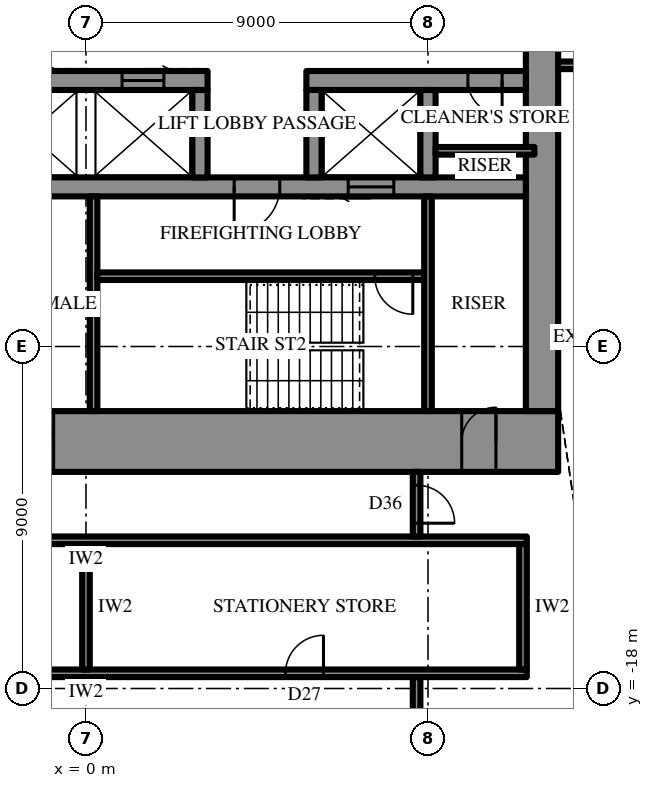
"""IFC4 building model, lengths in metres.
Left out: names, types, materials, properties, quantities, classifications, styles, units other than length and angle.
Written with IfcOpenShell. Run it as: python <this file> out.ifc"""

import sys

from ifc_helpers import new_model, si_unit, direction, frame, frame_2d, origin, place, context, subcontext, project, spatial, rectangle, extrude, element, fill, save


model = new_model("IFC4")
c1 = context("Model", 3, precision=1e-05, world=origin(), true_north=direction((0.0, 1.0)))
c2 = subcontext(c1, "Body", "Model", "MODEL_VIEW")
j1 = project(units=[si_unit("LENGTHUNIT", "METRE"), si_unit("PLANEANGLEUNIT", "RADIAN")], contexts=[c1])
p1 = place(None, origin())
s1 = spatial("IfcSite", under=j1, at=p1, CompositionType="ELEMENT")
p2 = place(p1, origin())
s2 = spatial("IfcBuilding", under=s1, at=p2, CompositionType="ELEMENT")
p3 = place(p2, frame((0.0, 0.0, 340.9)))
s3 = spatial("IfcBuildingStorey", under=s2, at=p3, CompositionType="ELEMENT", Elevation=340.9)
p4 = place(p3, frame((12.425, -11.5, 0.0), z_axis=(0.0, 0.0, 1.0), x_axis=(-1.0, 0.0, 0.0)))
e1 = element("IfcWall", 1, at=p4, inside=s3, PredefinedType="SHEAR", context=c2, shape_type="SweptSolid", body=[
    extrude(rectangle(XDim=24.85, YDim=1.6, at=frame_2d((12.425, 0.0))), origin(), (0.0, 0.0, 1.0), 4.2),
])
p5 = place(p4, frame((13.275, 0.0, 0.0)))
e2 = element("IfcOpeningElement", 2, at=p5, cuts=e1, PredefinedType="OPENING", context=c2, shape_type="SweptSolid", body=[
    extrude(rectangle(XDim=0.9, YDim=2.2, at=frame_2d((0.45, 1.1))), frame((0.0, 0.81, 0.0), z_axis=(0.0, -1.0, 0.0), x_axis=(1.0, 0.0, 0.0)), (0.0, 0.0, 1.0), 1.62),
])
p6 = place(p4, frame((16.275, 0.0, 0.0)))
e3 = element("IfcOpeningElement", 3, at=p6, cuts=e1, PredefinedType="OPENING", context=c2, shape_type="SweptSolid", body=[
    extrude(rectangle(XDim=0.9, YDim=2.2, at=frame_2d((0.45, 1.1))), frame((0.0, 0.81, 0.0), z_axis=(0.0, -1.0, 0.0), x_axis=(1.0, 0.0, 0.0)), (0.0, 0.0, 1.0), 1.62),
])
p7 = place(p4, frame((19.325, 0.0, 0.0)))
e4 = element("IfcOpeningElement", 4, at=p7, cuts=e1, PredefinedType="OPENING", context=c2, shape_type="SweptSolid", body=[
    extrude(rectangle(XDim=1.0, YDim=2.2, at=frame_2d((0.5, 1.1))), frame((0.0, 0.81, 0.0), z_axis=(0.0, -1.0, 0.0), x_axis=(1.0, 0.0, 0.0)), (0.0, 0.0, 1.0), 1.62),
])
p8 = place(p4, frame((1.637, 0.0, 0.0)))
e5 = element("IfcOpeningElement", 5, at=p8, cuts=e1, PredefinedType="OPENING", context=c2, shape_type="SweptSolid", body=[
    extrude(rectangle(XDim=0.9, YDim=2.2, at=frame_2d((0.45, 1.1))), frame((0.0, 0.81, 0.0), z_axis=(0.0, -1.0, 0.0), x_axis=(1.0, 0.0, 0.0)), (0.0, 0.0, 1.0), 1.62),
])
p9 = place(p4, frame((22.312, 0.0, 0.0)))
e6 = element("IfcOpeningElement", 6, at=p9, cuts=e1, PredefinedType="OPENING", context=c2, shape_type="SweptSolid", body=[
    extrude(rectangle(XDim=0.9, YDim=2.2, at=frame_2d((0.45, 1.1))), frame((0.0, 0.81, 0.0), z_axis=(0.0, -1.0, 0.0), x_axis=(1.0, 0.0, 0.0)), (0.0, 0.0, 1.0), 1.62),
])
p10 = place(p3, frame((12.0, -10.7, 0.0), z_axis=(0.0, 0.0, 1.0), x_axis=(0.0, 1.0, 0.0)))
e7 = element("IfcWall", 7, at=p10, inside=s3, PredefinedType="SHEAR", context=c2, shape_type="SweptSolid", body=[
    extrude(rectangle(XDim=21.4, YDim=0.85, at=frame_2d((10.7, 0.0))), origin(), (0.0, 0.0, 1.0), 4.2),
])
p11 = place(p10, frame((9.8, 0.0, 0.0)))
e8 = element("IfcOpeningElement", 8, at=p11, cuts=e7, PredefinedType="OPENING", context=c2, shape_type="SweptSolid", body=[
    extrude(rectangle(XDim=1.8, YDim=2.4, at=frame_2d((0.9, 1.2))), frame((0.0, 0.435, 0.0), z_axis=(0.0, -1.0, 0.0), x_axis=(1.0, 0.0, 0.0)), (0.0, 0.0, 1.0), 0.87),
])
p12 = place(p3, frame((11.575, -2.0, 0.0), z_axis=(0.0, 0.0, 1.0), x_axis=(-1.0, 0.0, 0.0)))
e9 = element("IfcWall", 9, at=p12, inside=s3, PredefinedType="SHEAR", context=c2, shape_type="SweptSolid", body=[
    extrude(rectangle(XDim=5.775, YDim=0.5, at=frame_2d((2.887, 0.0))), origin(), (0.0, 0.0, 1.0), 4.2),
])
p13 = place(p12, frame((0.625, 0.0, 0.0)))
e10 = element("IfcOpeningElement", 10, at=p13, cuts=e9, PredefinedType="OPENING", context=c2, shape_type="SweptSolid", body=[
    extrude(rectangle(XDim=0.9, YDim=2.2, at=frame_2d((0.45, 1.1))), frame((0.0, 0.26, 0.0), z_axis=(0.0, -1.0, 0.0), x_axis=(1.0, 0.0, 0.0)), (0.0, 0.0, 1.0), 0.52),
])
p14 = place(p3, frame((3.2, -2.0, 0.0), z_axis=(0.0, 0.0, 1.0), x_axis=(-1.0, 0.0, 0.0)))
e11 = element("IfcWall", 11, at=p14, inside=s3, PredefinedType="SHEAR", context=c2, shape_type="SweptSolid", body=[
    extrude(rectangle(XDim=14.775, YDim=0.5, at=frame_2d((7.387, 0.0))), origin(), (0.0, 0.0, 1.0), 4.2),
])
p15 = place(p14, frame((13.25, 0.0, 0.0)))
e12 = element("IfcOpeningElement", 12, at=p15, cuts=e11, PredefinedType="OPENING", context=c2, shape_type="SweptSolid", body=[
    extrude(rectangle(XDim=0.9, YDim=2.2, at=frame_2d((0.45, 1.1))), frame((0.0, 0.26, 0.0), z_axis=(0.0, -1.0, 0.0), x_axis=(1.0, 0.0, 0.0)), (0.0, 0.0, 1.0), 0.52),
])
p16 = place(p14, frame((1.15, 0.0, 0.0)))
e13 = element("IfcOpeningElement", 13, at=p16, cuts=e11, PredefinedType="OPENING", context=c2, shape_type="SweptSolid", body=[
    extrude(rectangle(XDim=1.1, YDim=2.2, at=frame_2d((0.55, 1.1))), frame((0.0, 0.26, 0.0), z_axis=(0.0, -1.0, 0.0), x_axis=(1.0, 0.0, 0.0)), (0.0, 0.0, 1.0), 0.52),
])
p17 = place(p14, frame((4.15, 0.0, 0.0)))
e14 = element("IfcOpeningElement", 14, at=p17, cuts=e11, PredefinedType="OPENING", context=c2, shape_type="SweptSolid", body=[
    extrude(rectangle(XDim=1.1, YDim=2.2, at=frame_2d((0.55, 1.1))), frame((0.0, 0.26, 0.0), z_axis=(0.0, -1.0, 0.0), x_axis=(1.0, 0.0, 0.0)), (0.0, 0.0, 1.0), 0.52),
])
p18 = place(p14, frame((7.15, 0.0, 0.0)))
e15 = element("IfcOpeningElement", 15, at=p18, cuts=e11, PredefinedType="OPENING", context=c2, shape_type="SweptSolid", body=[
    extrude(rectangle(XDim=1.1, YDim=2.2, at=frame_2d((0.55, 1.1))), frame((0.0, 0.26, 0.0), z_axis=(0.0, -1.0, 0.0), x_axis=(1.0, 0.0, 0.0)), (0.0, 0.0, 1.0), 0.52),
])
p19 = place(p14, frame((10.15, 0.0, 0.0)))
e16 = element("IfcOpeningElement", 16, at=p19, cuts=e11, PredefinedType="OPENING", context=c2, shape_type="SweptSolid", body=[
    extrude(rectangle(XDim=1.1, YDim=2.2, at=frame_2d((0.55, 1.1))), frame((0.0, 0.26, 0.0), z_axis=(0.0, -1.0, 0.0), x_axis=(1.0, 0.0, 0.0)), (0.0, 0.0, 1.0), 0.52),
])
p20 = place(p3, frame((11.575, -4.8, 0.0), z_axis=(0.0, 0.0, 1.0), x_axis=(-1.0, 0.0, 0.0)))
e17 = element("IfcWall", 17, at=p20, inside=s3, PredefinedType="SHEAR", context=c2, shape_type="SweptSolid", body=[
    extrude(rectangle(XDim=23.15, YDim=0.5, at=frame_2d((11.575, 0.0))), origin(), (0.0, 0.0, 1.0), 4.2),
])
p21 = place(p20, frame((6.475, 0.0, 0.0)))
e18 = element("IfcOpeningElement", 18, at=p21, cuts=e17, PredefinedType="OPENING", context=c2, shape_type="SweptSolid", body=[
    extrude(rectangle(XDim=1.2, YDim=2.2, at=frame_2d((0.6, 1.1))), frame((0.0, 0.26, 0.0), z_axis=(0.0, -1.0, 0.0), x_axis=(1.0, 0.0, 0.0)), (0.0, 0.0, 1.0), 0.52),
])
p22 = place(p20, frame((3.475, 0.0, 0.0)))
e19 = element("IfcOpeningElement", 19, at=p22, cuts=e17, PredefinedType="OPENING", context=c2, shape_type="SweptSolid", body=[
    extrude(rectangle(XDim=1.2, YDim=2.2, at=frame_2d((0.6, 1.1))), frame((0.0, 0.26, 0.0), z_axis=(0.0, -1.0, 0.0), x_axis=(1.0, 0.0, 0.0)), (0.0, 0.0, 1.0), 0.52),
])
for number, where, z_axis, x_axis in (
    (20, (9.0, -2.25, 0.0), (0.0, 0.0, 1.0), (0.0, -1.0, 0.0)),
    (21, (6.0, -2.25, 0.0), (0.0, 0.0, 1.0), (0.0, -1.0, 0.0)),
    (22, (3.0, -2.25, 0.0), (0.0, 0.0, 1.0), (0.0, -1.0, 0.0)),
):
    element("IfcWall", number, at=place(p3, frame(where, z_axis=z_axis, x_axis=x_axis)), inside=s3, PredefinedType="SHEAR", context=c2, shape_type="SweptSolid", body=[
        extrude(rectangle(XDim=2.3, YDim=0.4, at=frame_2d((1.15, 0.0))), origin(), (0.0, 0.0, 1.0), 4.2),
    ])
p23 = place(p3, frame((0.2, -5.05, 0.0), z_axis=(0.0, 0.0, 1.0), x_axis=(0.0, -1.0, 0.0)))
e23 = element("IfcWall", 23, at=p23, inside=s3, PredefinedType="SHEAR", context=c2, shape_type="SweptSolid", body=[
    extrude(rectangle(XDim=5.65, YDim=0.2, at=frame_2d((2.825, 0.0))), origin(), (0.0, 0.0, 1.0), 4.2),
])
p24 = place(p3, frame((8.9, -7.15, 0.0), z_axis=(0.0, 0.0, 1.0), x_axis=(-1.0, 0.0, 0.0)))
e24 = element("IfcWall", 24, at=p24, inside=s3, PredefinedType="SHEAR", context=c2, shape_type="SweptSolid", body=[
    extrude(rectangle(XDim=8.6, YDim=0.2, at=frame_2d((4.3, 0.0))), origin(), (0.0, 0.0, 1.0), 4.2),
])
p25 = place(p24, frame((0.3, 0.0, 0.0)))
e25 = element("IfcOpeningElement", 25, at=p25, cuts=e24, PredefinedType="OPENING", context=c2, shape_type="SweptSolid", body=[
    extrude(rectangle(XDim=1.0, YDim=2.2, at=frame_2d((0.5, 1.1))), frame((0.0, 0.11, 0.0), z_axis=(0.0, -1.0, 0.0), x_axis=(1.0, 0.0, 0.0)), (0.0, 0.0, 1.0), 0.22),
])
p26 = place(p3, frame((9.0, -5.05, 0.0), z_axis=(0.0, 0.0, 1.0), x_axis=(0.0, -1.0, 0.0)))
e26 = element("IfcWall", 26, at=p26, inside=s3, PredefinedType="PARTITIONING", context=c2, shape_type="SweptSolid", body=[
    extrude(rectangle(XDim=5.65, YDim=0.2, at=frame_2d((2.825, 0.0))), origin(), (0.0, 0.0, 1.0), 4.0),
])
p27 = place(p3, frame((11.8, -3.85, 0.0), z_axis=(0.0, 0.0, 1.0), x_axis=(-1.0, 0.0, 0.0)))
e27 = element("IfcWall", 27, at=p27, inside=s3, PredefinedType="PARTITIONING", context=c2, shape_type="SweptSolid", body=[
    extrude(rectangle(XDim=2.6, YDim=0.2, at=frame_2d((1.3, 0.0))), origin(), (0.0, 0.0, 1.0), 4.0),
])
p28 = place(p3, frame((11.6, -14.1, 0.0), z_axis=(0.0, 0.0, 1.0), x_axis=(-1.0, 0.0, 0.0)))
e28 = element("IfcWall", 28, at=p28, inside=s3, PredefinedType="PARTITIONING", context=c2, shape_type="SweptSolid", body=[
    extrude(rectangle(XDim=23.2, YDim=0.2, at=frame_2d((11.6, 0.0))), origin(), (0.0, 0.0, 1.0), 4.0),
])
p29 = place(p3, frame((11.6, -17.6, 0.0), z_axis=(0.0, 0.0, 1.0), x_axis=(-1.0, 0.0, 0.0)))
e29 = element("IfcWall", 29, at=p29, inside=s3, PredefinedType="PARTITIONING", context=c2, shape_type="SweptSolid", body=[
    extrude(rectangle(XDim=23.2, YDim=0.2, at=frame_2d((11.6, 0.0))), origin(), (0.0, 0.0, 1.0), 4.0),
])
p30 = place(p29, frame((5.35, 0.0, 0.0)))
e30 = element("IfcOpeningElement", 30, at=p30, cuts=e29, PredefinedType="OPENING", context=c2, shape_type="SweptSolid", body=[
    extrude(rectangle(XDim=1.0, YDim=2.2, at=frame_2d((0.5, 1.1))), frame((0.0, 0.11, 0.0), z_axis=(0.0, -1.0, 0.0), x_axis=(1.0, 0.0, 0.0)), (0.0, 0.0, 1.0), 0.22),
])
p31 = place(p29, frame((16.85, 0.0, 0.0)))
e31 = element("IfcOpeningElement", 31, at=p31, cuts=e29, PredefinedType="OPENING", context=c2, shape_type="SweptSolid", body=[
    extrude(rectangle(XDim=1.0, YDim=2.2, at=frame_2d((0.5, 1.1))), frame((0.0, 0.11, 0.0), z_axis=(0.0, -1.0, 0.0), x_axis=(1.0, 0.0, 0.0)), (0.0, 0.0, 1.0), 0.22),
])
p32 = place(p3, frame((11.5, -14.2, 0.0), z_axis=(0.0, 0.0, 1.0), x_axis=(0.0, -1.0, 0.0)))
e32 = element("IfcWall", 32, at=p32, inside=s3, PredefinedType="PARTITIONING", context=c2, shape_type="SweptSolid", body=[
    extrude(rectangle(XDim=3.3, YDim=0.2, at=frame_2d((1.65, 0.0))), origin(), (0.0, 0.0, 1.0), 4.0),
])
p33 = place(p3, frame((0.0, -14.2, 0.0), z_axis=(0.0, 0.0, 1.0), x_axis=(0.0, -1.0, 0.0)))
e33 = element("IfcWall", 33, at=p33, inside=s3, PredefinedType="PARTITIONING", context=c2, shape_type="SweptSolid", body=[
    extrude(rectangle(XDim=3.3, YDim=0.2, at=frame_2d((1.65, 0.0))), origin(), (0.0, 0.0, 1.0), 2.992),
])
p34 = place(p3, frame((8.7, -12.3, 0.0), z_axis=(0.0, 0.0, 1.0), x_axis=(0.0, -1.0, 0.0)))
e34 = element("IfcWall", 34, at=p34, inside=s3, PredefinedType="PARTITIONING", context=c2, shape_type="SweptSolid", body=[
    extrude(rectangle(XDim=1.7, YDim=0.2, at=frame_2d((0.85, 0.0))), origin(), (0.0, 0.0, 1.0), 2.992),
])
p35 = place(p34, frame((0.35, 0.0, 0.0)))
e35 = element("IfcOpeningElement", 35, at=p35, cuts=e34, PredefinedType="OPENING", context=c2, shape_type="SweptSolid", body=[
    extrude(rectangle(XDim=1.0, YDim=2.2, at=frame_2d((0.5, 1.1))), frame((0.0, 0.11, 0.0), z_axis=(0.0, -1.0, 0.0), x_axis=(1.0, 0.0, 0.0)), (0.0, 0.0, 1.0), 0.22),
])
p36 = place(p3, frame((8.7, -17.7, 0.0), z_axis=(0.0, 0.0, 1.0), x_axis=(0.0, -1.0, 0.0)))
e36 = element("IfcWall", 36, at=p36, inside=s3, PredefinedType="PARTITIONING", context=c2, shape_type="SweptSolid", body=[
    extrude(rectangle(XDim=8.15, YDim=0.2, at=frame_2d((4.075, 0.0))), origin(), (0.0, 0.0, 1.0), 2.992),
])
p37 = place(p3, frame((12.425, -1.6, 0.0), z_axis=(0.0, 0.0, 1.0), x_axis=(1.0, 0.0, 0.0)))
e37 = element("IfcWall", 37, at=p37, inside=s3, PredefinedType="PARTITIONING", context=c2, shape_type="SweptSolid", body=[
    extrude(rectangle(XDim=16.5, YDim=0.2, at=frame_2d((8.25, 0.0))), origin(), (0.0, 0.0, 1.0), 4.0),
])
p38 = place(p37, frame((1.15, 0.0, 0.0)))
e38 = element("IfcOpeningElement", 38, at=p38, cuts=e37, PredefinedType="OPENING", context=c2, shape_type="SweptSolid", body=[
    extrude(rectangle(XDim=1.0, YDim=2.2, at=frame_2d((0.5, 1.1))), frame((0.0, 0.11, 0.0), z_axis=(0.0, -1.0, 0.0), x_axis=(1.0, 0.0, 0.0)), (0.0, 0.0, 1.0), 0.22),
])
p39 = place(p21, origin())
e39 = element("IfcDoor", 39, at=p39, inside=s3, OperationType="SINGLE_SWING_LEFT", PredefinedType="DOOR", context=c2, shape_type="SweptSolid", body=[
    extrude(rectangle(XDim=1.2, YDim=2.2, at=frame_2d((0.6, 1.1))), frame((0.0, 0.025, 0.0), z_axis=(0.0, -1.0, 0.0), x_axis=(1.0, 0.0, 0.0)), (0.0, 0.0, 1.0), 0.05),
])
fill(e18, e39)
p40 = place(p25, origin())
e40 = element("IfcDoor", 40, at=p40, inside=s3, OperationType="SINGLE_SWING_RIGHT", PredefinedType="DOOR", context=c2, shape_type="SweptSolid", body=[
    extrude(rectangle(XDim=1.0, YDim=2.2, at=frame_2d((0.5, 1.1))), frame((0.0, 0.025, 0.0), z_axis=(0.0, -1.0, 0.0), x_axis=(1.0, 0.0, 0.0)), (0.0, 0.0, 1.0), 0.05),
])
fill(e25, e40)
p41 = place(p5, frame((0.9, 0.0, 0.0), z_axis=(0.0, 0.0, 1.0), x_axis=(-1.0, 0.0, 0.0)))
e41 = element("IfcDoor", 41, at=p41, inside=s3, OperationType="SINGLE_SWING_RIGHT", PredefinedType="DOOR", context=c2, shape_type="SweptSolid", body=[
    extrude(rectangle(XDim=0.9, YDim=2.2, at=frame_2d((0.45, 1.1))), frame((0.0, 0.025, 0.0), z_axis=(0.0, -1.0, 0.0), x_axis=(1.0, 0.0, 0.0)), (0.0, 0.0, 1.0), 0.05),
])
fill(e2, e41)
p42 = place(p8, frame((0.9, 0.0, 0.0), z_axis=(0.0, 0.0, 1.0), x_axis=(-1.0, 0.0, 0.0)))
e42 = element("IfcDoor", 42, at=p42, inside=s3, OperationType="SINGLE_SWING_LEFT", PredefinedType="DOOR", context=c2, shape_type="SweptSolid", body=[
    extrude(rectangle(XDim=0.9, YDim=2.2, at=frame_2d((0.45, 1.1))), frame((0.0, 0.025, 0.0), z_axis=(0.0, -1.0, 0.0), x_axis=(1.0, 0.0, 0.0)), (0.0, 0.0, 1.0), 0.05),
])
fill(e5, e42)
p43 = place(p13, origin())
e43 = element("IfcDoor", 43, at=p43, inside=s3, OperationType="SINGLE_SWING_RIGHT", PredefinedType="DOOR", context=c2, shape_type="SweptSolid", body=[
    extrude(rectangle(XDim=0.9, YDim=2.2, at=frame_2d((0.45, 1.1))), frame((0.0, 0.025, 0.0), z_axis=(0.0, -1.0, 0.0), x_axis=(1.0, 0.0, 0.0)), (0.0, 0.0, 1.0), 0.05),
])
fill(e10, e43)
p44 = place(p22, origin())
e44 = element("IfcDoor", 44, at=p44, inside=s3, OperationType="SLIDING_TO_LEFT", PredefinedType="DOOR", context=c2, shape_type="SweptSolid", body=[
    extrude(rectangle(XDim=1.2, YDim=2.2, at=frame_2d((0.6, 1.1))), frame((0.0, 0.025, 0.0), z_axis=(0.0, -1.0, 0.0), x_axis=(1.0, 0.0, 0.0)), (0.0, 0.0, 1.0), 0.05),
])
fill(e19, e44)
p45 = place(p16, frame((1.1, 0.0, 0.0), z_axis=(0.0, 0.0, 1.0), x_axis=(-1.0, 0.0, 0.0)))
e45 = element("IfcDoor", 45, at=p45, inside=s3, OperationType="SLIDING_TO_LEFT", PredefinedType="DOOR", context=c2, shape_type="SweptSolid", body=[
    extrude(rectangle(XDim=1.1, YDim=2.2, at=frame_2d((0.55, 1.1))), frame((0.0, 0.025, 0.0), z_axis=(0.0, -1.0, 0.0), x_axis=(1.0, 0.0, 0.0)), (0.0, 0.0, 1.0), 0.05),
])
fill(e13, e45)
p46 = place(p30, frame((1.0, 0.0, 0.0), z_axis=(0.0, 0.0, 1.0), x_axis=(-1.0, 0.0, 0.0)))
e46 = element("IfcDoor", 46, at=p46, inside=s3, OperationType="SINGLE_SWING_LEFT", PredefinedType="DOOR", context=c2, shape_type="SweptSolid", body=[
    extrude(rectangle(XDim=1.0, YDim=2.2, at=frame_2d((0.5, 1.1))), frame((0.0, 0.025, 0.0), z_axis=(0.0, -1.0, 0.0), x_axis=(1.0, 0.0, 0.0)), (0.0, 0.0, 1.0), 0.05),
])
fill(e30, e46)
p47 = place(p35, origin())
e47 = element("IfcDoor", 47, at=p47, inside=s3, OperationType="SINGLE_SWING_LEFT", PredefinedType="DOOR", context=c2, shape_type="SweptSolid", body=[
    extrude(rectangle(XDim=1.0, YDim=2.2, at=frame_2d((0.5, 1.1))), frame((0.0, 0.025, 0.0), z_axis=(0.0, -1.0, 0.0), x_axis=(1.0, 0.0, 0.0)), (0.0, 0.0, 1.0), 0.05),
])
fill(e35, e47)
save(model, sys.argv[1])
